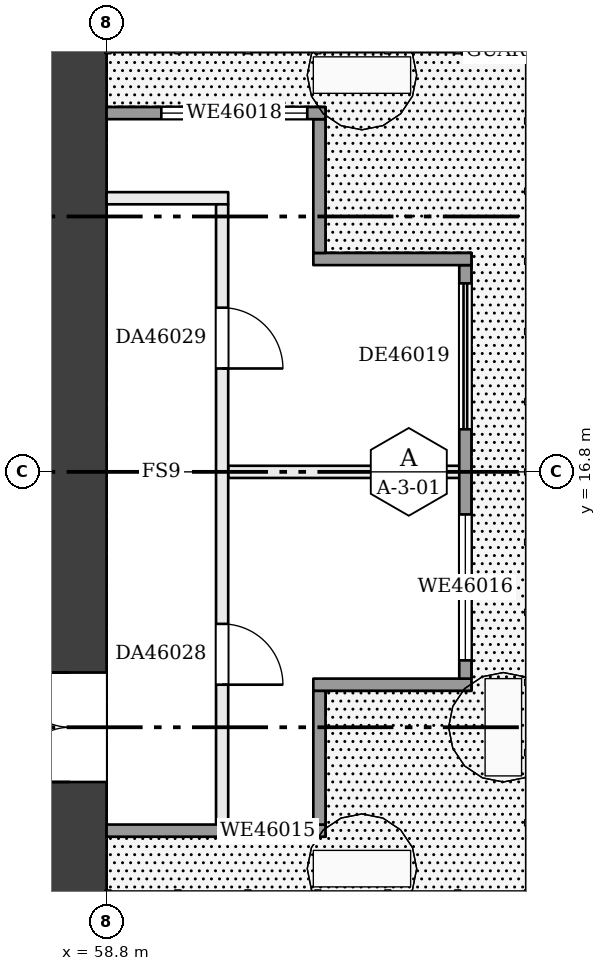
"""IFC4 building model, lengths in metres.
Left out: names, types, materials, properties, quantities, classifications, styles, units other than length and angle.
Written with IfcOpenShell. Run it as: python <this file> out.ifc"""

import sys

from ifc_helpers import new_model, si_unit, direction, frame, frame_2d, origin, place, context, subcontext, project, spatial, rectangle, extrude, element, fill, save


model = new_model("IFC4")
c1 = context("Model", 3, precision=1e-05, world=origin(), true_north=direction((0.0, 1.0)))
c2 = subcontext(c1, "Body", "Model", "MODEL_VIEW")
j1 = project(units=[si_unit("LENGTHUNIT", "METRE"), si_unit("PLANEANGLEUNIT", "RADIAN")], contexts=[c1])
p1 = place(None, origin())
s1 = spatial("IfcSite", under=j1, at=p1, CompositionType="ELEMENT")
p2 = place(p1, origin())
s2 = spatial("IfcBuilding", under=s1, at=p2, CompositionType="ELEMENT")
p3 = place(p2, frame((0.0, 0.0, 179.2)))
s3 = spatial("IfcBuildingStorey", under=s2, at=p3, CompositionType="ELEMENT", Elevation=179.2)
p4 = place(p3, frame((58.2, 9.6, 0.0), z_axis=(0.0, 0.0, 1.0), x_axis=(0.0, 1.0, 0.0)))
e1 = element("IfcWall", 1, at=p4, inside=s3, PredefinedType="SHEAR", context=c2, shape_type="SweptSolid", body=[
    extrude(rectangle(XDim=14.4, YDim=1.2, at=frame_2d((7.2, 0.0))), origin(), (0.0, 0.0, 1.0), 3.22),
])
p5 = place(p4, frame((2.1, 0.0, 0.0)))
e2 = element("IfcOpeningElement", 2, at=p5, cuts=e1, PredefinedType="OPENING", context=c2, shape_type="SweptSolid", body=[
    extrude(rectangle(XDim=1.8, YDim=2.1, at=frame_2d((0.9, 1.05))), frame((0.0, 0.61, 0.0), z_axis=(0.0, -1.0, 0.0), x_axis=(1.0, 0.0, 0.0)), (0.0, 0.0, 1.0), 1.22),
])
p6 = place(p3, frame((60.8, 16.8, 0.0), z_axis=(0.0, 0.0, 1.0), x_axis=(1.0, 0.0, 0.0)))
e3 = element("IfcWall", 3, at=p6, inside=s3, PredefinedType="PARTITIONING", context=c2, shape_type="SweptSolid", body=[
    extrude(rectangle(XDim=3.9, YDim=0.2, at=frame_2d((1.95, 0.0))), origin(), (0.0, 0.0, 1.0), 3.22),
])
p7 = place(p3, frame((58.8, 21.3, 0.0), z_axis=(0.0, 0.0, 1.0), x_axis=(1.0, 0.0, 0.0)))
e4 = element("IfcWall", 4, at=p7, inside=s3, PredefinedType="PARTITIONING", context=c2, shape_type="SweptSolid", body=[
    extrude(rectangle(XDim=2.0, YDim=0.2, at=frame_2d((1.0, 0.0))), origin(), (0.0, 0.0, 1.0), 3.22),
])
p8 = place(p3, frame((60.7, 10.9, 0.0), z_axis=(0.0, 0.0, 1.0), x_axis=(0.0, 1.0, 0.0)))
e5 = element("IfcWall", 5, at=p8, inside=s3, PredefinedType="PARTITIONING", context=c2, shape_type="SweptSolid", body=[
    extrude(rectangle(XDim=10.3, YDim=0.2, at=frame_2d((5.15, 0.0))), origin(), (0.0, 0.0, 1.0), 3.22),
])
p9 = place(p8, frame((2.4, 0.0, 0.0)))
e6 = element("IfcOpeningElement", 6, at=p9, cuts=e5, PredefinedType="OPENING", context=c2, shape_type="SweptSolid", body=[
    extrude(rectangle(XDim=1.0, YDim=2.1, at=frame_2d((0.5, 1.05))), frame((0.0, 0.11, 0.0), z_axis=(0.0, -1.0, 0.0), x_axis=(1.0, 0.0, 0.0)), (0.0, 0.0, 1.0), 0.22),
])
p10 = place(p8, frame((7.6, 0.0, 0.0)))
e7 = element("IfcOpeningElement", 7, at=p10, cuts=e5, PredefinedType="OPENING", context=c2, shape_type="SweptSolid", body=[
    extrude(rectangle(XDim=1.0, YDim=2.1, at=frame_2d((0.5, 1.05))), frame((0.0, 0.11, 0.0), z_axis=(0.0, -1.0, 0.0), x_axis=(1.0, 0.0, 0.0)), (0.0, 0.0, 1.0), 0.22),
])
p11 = place(p3, frame((58.8, 10.9, 0.0), z_axis=(0.0, 0.0, 1.0), x_axis=(1.0, 0.0, 0.0)))
e8 = element("IfcWall", 8, at=p11, inside=s3, PredefinedType="SOLIDWALL", context=c2, shape_type="SweptSolid", body=[
    extrude(rectangle(XDim=3.6, YDim=0.2, at=frame_2d((1.8, 0.0))), origin(), (0.0, 0.0, 1.0), 3.22),
])
p12 = place(p11, frame((2.0, 0.0, 0.9)))
e9 = element("IfcOpeningElement", 9, at=p12, cuts=e8, PredefinedType="OPENING", context=c2, shape_type="SweptSolid", body=[
    extrude(rectangle(XDim=1.3, YDim=1.5, at=frame_2d((0.65, 0.75))), frame((0.0, 0.11, 0.0), z_axis=(0.0, -1.0, 0.0), x_axis=(1.0, 0.0, 0.0)), (0.0, 0.0, 1.0), 0.22),
])
p13 = place(p3, frame((62.3, 11.0, 0.0), z_axis=(0.0, 0.0, 1.0), x_axis=(0.0, 1.0, 0.0)))
e10 = element("IfcWall", 10, at=p13, inside=s3, PredefinedType="SOLIDWALL", context=c2, shape_type="SweptSolid", body=[
    extrude(rectangle(XDim=2.2, YDim=0.2, at=frame_2d((1.1, 0.0))), origin(), (0.0, 0.0, 1.0), 3.22),
])
p14 = place(p3, frame((62.2, 13.3, 0.0), z_axis=(0.0, 0.0, 1.0), x_axis=(1.0, 0.0, 0.0)))
e11 = element("IfcWall", 11, at=p14, inside=s3, PredefinedType="SOLIDWALL", context=c2, shape_type="SweptSolid", body=[
    extrude(rectangle(XDim=2.6, YDim=0.2, at=frame_2d((1.3, 0.0))), origin(), (0.0, 0.0, 1.0), 3.22),
])
p15 = place(p3, frame((64.7, 13.4, 0.0), z_axis=(0.0, 0.0, 1.0), x_axis=(0.0, 1.0, 0.0)))
e12 = element("IfcWall", 12, at=p15, inside=s3, PredefinedType="SOLIDWALL", context=c2, shape_type="SweptSolid", body=[
    extrude(rectangle(XDim=6.8, YDim=0.2, at=frame_2d((3.4, 0.0))), origin(), (0.0, 0.0, 1.0), 3.22),
])
p16 = place(p15, frame((0.3, 0.0, 0.9)))
e13 = element("IfcOpeningElement", 13, at=p16, cuts=e12, PredefinedType="OPENING", context=c2, shape_type="SweptSolid", body=[
    extrude(rectangle(XDim=2.4, YDim=1.5, at=frame_2d((1.2, 0.75))), frame((0.0, 0.11, 0.0), z_axis=(0.0, -1.0, 0.0), x_axis=(1.0, 0.0, 0.0)), (0.0, 0.0, 1.0), 0.22),
])
p17 = place(p15, frame((4.1, 0.0, 0.0)))
e14 = element("IfcOpeningElement", 14, at=p17, cuts=e12, PredefinedType="OPENING", context=c2, shape_type="SweptSolid", body=[
    extrude(rectangle(XDim=2.4, YDim=2.2, at=frame_2d((1.2, 1.1))), frame((0.0, 0.11, 0.0), z_axis=(0.0, -1.0, 0.0), x_axis=(1.0, 0.0, 0.0)), (0.0, 0.0, 1.0), 0.22),
])
p18 = place(p3, frame((64.8, 20.3, 0.0), z_axis=(0.0, 0.0, 1.0), x_axis=(-1.0, 0.0, 0.0)))
e15 = element("IfcWall", 15, at=p18, inside=s3, PredefinedType="SOLIDWALL", context=c2, shape_type="SweptSolid", body=[
    extrude(rectangle(XDim=2.6, YDim=0.2, at=frame_2d((1.3, 0.0))), origin(), (0.0, 0.0, 1.0), 3.22),
])
p19 = place(p3, frame((62.3, 20.4, 0.0), z_axis=(0.0, 0.0, 1.0), x_axis=(0.0, 1.0, 0.0)))
e16 = element("IfcWall", 16, at=p19, inside=s3, PredefinedType="SOLIDWALL", context=c2, shape_type="SweptSolid", body=[
    extrude(rectangle(XDim=2.2, YDim=0.2, at=frame_2d((1.1, 0.0))), origin(), (0.0, 0.0, 1.0), 3.22),
])
p20 = place(p3, frame((62.4, 22.7, 0.0), z_axis=(0.0, 0.0, 1.0), x_axis=(-1.0, 0.0, 0.0)))
e17 = element("IfcWall", 17, at=p20, inside=s3, PredefinedType="SOLIDWALL", context=c2, shape_type="SweptSolid", body=[
    extrude(rectangle(XDim=3.6, YDim=0.2, at=frame_2d((1.8, 0.0))), origin(), (0.0, 0.0, 1.0), 3.22),
])
p21 = place(p20, frame((0.3, 0.0, 0.9)))
e18 = element("IfcOpeningElement", 18, at=p21, cuts=e17, PredefinedType="OPENING", context=c2, shape_type="SweptSolid", body=[
    extrude(rectangle(XDim=2.4, YDim=1.5, at=frame_2d((1.2, 0.75))), frame((0.0, 0.11, 0.0), z_axis=(0.0, -1.0, 0.0), x_axis=(1.0, 0.0, 0.0)), (0.0, 0.0, 1.0), 0.22),
])
p22 = place(p5, origin())
e19 = element("IfcDoor", 19, at=p22, inside=s3, OperationType="DOUBLE_DOOR_SINGLE_SWING", PredefinedType="DOOR", context=c2, shape_type="SweptSolid", body=[
    extrude(rectangle(XDim=1.8, YDim=2.1, at=frame_2d((0.9, 1.05))), frame((0.0, 0.025, 0.0), z_axis=(0.0, -1.0, 0.0), x_axis=(1.0, 0.0, 0.0)), (0.0, 0.0, 1.0), 0.05),
])
fill(e2, e19)
p23 = place(p9, frame((1.0, 0.0, 0.0), z_axis=(0.0, 0.0, 1.0), x_axis=(-1.0, 0.0, 0.0)))
e20 = element("IfcDoor", 20, at=p23, inside=s3, OperationType="SINGLE_SWING_RIGHT", PredefinedType="DOOR", context=c2, shape_type="SweptSolid", body=[
    extrude(rectangle(XDim=1.0, YDim=2.1, at=frame_2d((0.5, 1.05))), frame((0.0, 0.025, 0.0), z_axis=(0.0, -1.0, 0.0), x_axis=(1.0, 0.0, 0.0)), (0.0, 0.0, 1.0), 0.05),
])
fill(e6, e20)
p24 = place(p10, frame((1.0, 0.0, 0.0), z_axis=(0.0, 0.0, 1.0), x_axis=(-1.0, 0.0, 0.0)))
e21 = element("IfcDoor", 21, at=p24, inside=s3, OperationType="SINGLE_SWING_RIGHT", PredefinedType="DOOR", context=c2, shape_type="SweptSolid", body=[
    extrude(rectangle(XDim=1.0, YDim=2.1, at=frame_2d((0.5, 1.05))), frame((0.0, 0.025, 0.0), z_axis=(0.0, -1.0, 0.0), x_axis=(1.0, 0.0, 0.0)), (0.0, 0.0, 1.0), 0.05),
])
fill(e7, e21)
p25 = place(p12, origin())
e22 = element("IfcWindow", 22, at=p25, inside=s3, PartitioningType="SINGLE_PANEL", PredefinedType="WINDOW", context=c2, shape_type="SweptSolid", body=[
    extrude(rectangle(XDim=1.3, YDim=1.5, at=frame_2d((0.65, 0.75))), frame((0.0, 0.03, 0.0), z_axis=(0.0, -1.0, 0.0), x_axis=(1.0, 0.0, 0.0)), (0.0, 0.0, 1.0), 0.06),
])
fill(e9, e22)
p26 = place(p16, origin())
e23 = element("IfcWindow", 23, at=p26, inside=s3, PartitioningType="SINGLE_PANEL", PredefinedType="WINDOW", context=c2, shape_type="SweptSolid", body=[
    extrude(rectangle(XDim=2.4, YDim=1.5, at=frame_2d((1.2, 0.75))), frame((0.0, 0.03, 0.0), z_axis=(0.0, -1.0, 0.0), x_axis=(1.0, 0.0, 0.0)), (0.0, 0.0, 1.0), 0.06),
])
fill(e13, e23)
p27 = place(p21, origin())
e24 = element("IfcWindow", 24, at=p27, inside=s3, PartitioningType="SINGLE_PANEL", PredefinedType="WINDOW", context=c2, shape_type="SweptSolid", body=[
    extrude(rectangle(XDim=2.4, YDim=1.5, at=frame_2d((1.2, 0.75))), frame((0.0, 0.03, 0.0), z_axis=(0.0, -1.0, 0.0), x_axis=(1.0, 0.0, 0.0)), (0.0, 0.0, 1.0), 0.06),
])
fill(e18, e24)
p28 = place(p17, origin())
e25 = element("IfcDoor", 25, at=p28, inside=s3, OperationType="DOUBLE_DOOR_SLIDING", PredefinedType="DOOR", context=c2, shape_type="SweptSolid", body=[
    extrude(rectangle(XDim=2.4, YDim=2.2, at=frame_2d((1.2, 1.1))), frame((0.0, 0.025, 0.0), z_axis=(0.0, -1.0, 0.0), x_axis=(1.0, 0.0, 0.0)), (0.0, 0.0, 1.0), 0.05),
])
fill(e14, e25)
save(model, sys.argv[1])
